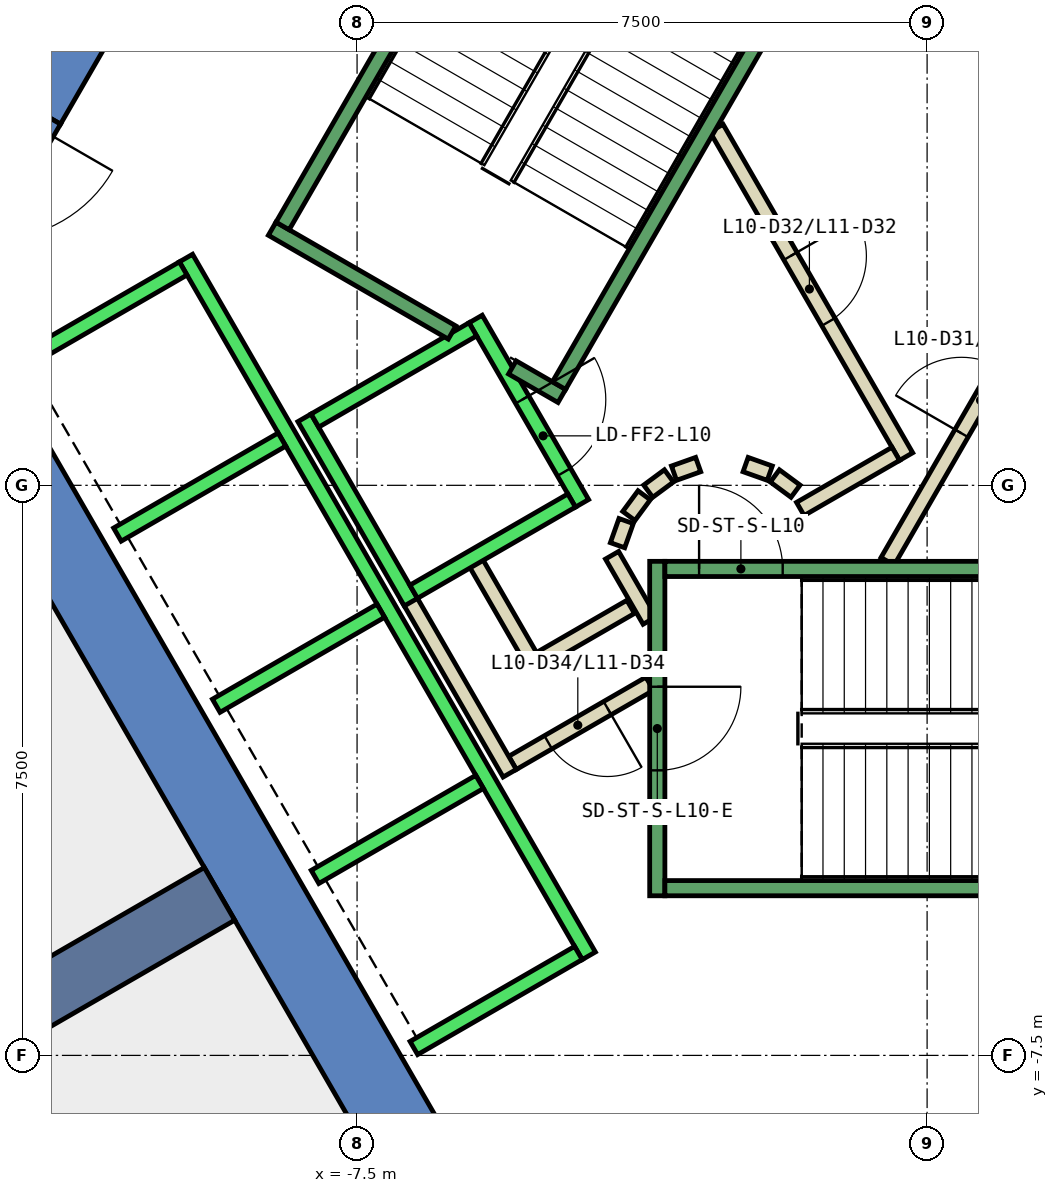
"""IFC4 building model, lengths in metres.
Left out: names, types, materials, properties, quantities, classifications, styles, units other than length and angle.
Written with IfcOpenShell. Run it as: python <this file> out.ifc"""

import sys

from ifc_helpers import new_model, si_unit, direction, frame, frame_2d, origin, place, context, subcontext, project, spatial, polyline, rectangle, outline, extrude, element, fill, save


model = new_model("IFC4")
c1 = context("Model", 3, precision=1e-05, world=origin(), true_north=direction((0.0, 1.0)))
c2 = subcontext(c1, "Body", "Model", "MODEL_VIEW")
j1 = project(units=[si_unit("LENGTHUNIT", "METRE"), si_unit("PLANEANGLEUNIT", "RADIAN")], contexts=[c1])
p1 = place(None, origin())
s1 = spatial("IfcSite", under=j1, at=p1, CompositionType="ELEMENT")
p2 = place(p1, origin())
s2 = spatial("IfcBuilding", under=s1, at=p2, CompositionType="ELEMENT")
p3 = place(p2, frame((0.0, 0.0, 51.8)))
s3 = spatial("IfcBuildingStorey", under=s2, at=p3, CompositionType="ELEMENT", Elevation=51.8)
p4 = place(p3, frame((0.0, 0.0, -0.4)))
e1 = element("IfcWall", 1, at=p4, inside=s3, PredefinedType="SHEAR", context=c2, shape_type="SweptSolid", body=[
    extrude(outline(polyline([(-12.267, 5.252), (-11.402, 4.752), (-6.351, 13.5), (-6.928, 14.5), (-12.267, 5.252)])), origin(), (0.0, 0.0, 1.0), 4.2),
])
p5 = place(p3, frame((0.0, 0.0, 3.6)))
e2 = element("IfcWall", 2, at=p5, inside=s3, PredefinedType="SHEAR", context=c2, shape_type="SweptSolid", body=[
    extrude(outline(polyline([(-13.267, 3.52), (-12.402, 3.02), (-11.402, 4.752), (-12.267, 5.252), (-13.267, 3.52)])), origin(), (0.0, 0.0, 1.0), 0.2),
])
p6 = place(p3, frame((0.0, 0.0, -0.4)))
e3 = element("IfcWall", 3, at=p6, inside=s3, PredefinedType="SHEAR", context=c2, shape_type="SweptSolid", body=[
    extrude(outline(polyline([(-13.856, 2.5), (-6.928, -9.5), (-6.351, -8.5), (-12.702, 2.5), (-13.856, 2.5)])), origin(), (0.0, 0.0, 1.0), 4.2),
])
p7 = place(p3, frame((-9.31, -5.375, -0.4), z_axis=(0.0, 0.0, 1.0), x_axis=(-0.866017533419, -0.500013631625, 0.0)))
e4 = element("IfcWall", 4, at=p7, inside=s3, PredefinedType="SHEAR", context=c2, shape_type="SweptSolid", body=[
    extrude(rectangle(XDim=9.0, YDim=0.8, at=frame_2d((4.5, 0.0))), origin(), (0.0, 0.0, 1.0), 4.2),
])
p8 = place(p3, frame((-3.9, -1.599, 0.0), z_axis=(0.0, 0.0, 1.0), x_axis=(-0.865969445389, -0.500096910261, 0.0)))
e5 = element("IfcWall", 5, at=p8, inside=s3, PredefinedType="PARTITIONING", context=c2, shape_type="SweptSolid", body=[
    extrude(rectangle(XDim=1.373, YDim=0.2, at=frame_2d((0.687, 0.0))), origin(), (0.0, 0.0, 1.0), 3.8),
])
p9 = place(p3, frame((-5.126, -2.422, 0.0), z_axis=(0.0, 0.0, 1.0), x_axis=(-0.500062241894, 0.865989465428, 0.0)))
e6 = element("IfcWall", 6, at=p9, inside=s3, PredefinedType="PARTITIONING", context=c2, shape_type="SweptSolid", body=[
    extrude(rectangle(XDim=1.7, YDim=0.2, at=frame_2d((0.85, 0.0))), origin(), (0.0, 0.0, 1.0), 3.8),
])
p10 = place(p3, frame((-3.65, -2.61, 0.0), z_axis=(0.0, 0.0, 1.0), x_axis=(-0.866072462134, -0.499918483688, 0.0)))
e7 = element("IfcWall", 7, at=p10, inside=s3, PredefinedType="PARTITIONING", context=c2, shape_type="SweptSolid", body=[
    extrude(rectangle(XDim=2.084, YDim=0.2, at=frame_2d((1.042, 0.0))), origin(), (0.0, 0.0, 1.0), 3.8),
])
p11 = place(p10, frame((0.642, 0.0, 0.0)))
e8 = element("IfcOpeningElement", 8, at=p11, cuts=e7, PredefinedType="OPENING", context=c2, shape_type="SweptSolid", body=[
    extrude(rectangle(XDim=0.9, YDim=2.1, at=frame_2d((0.45, 1.05))), frame((0.0, 0.11, 0.0), z_axis=(0.0, -1.0, 0.0), x_axis=(1.0, 0.0, 0.0)), (0.0, 0.0, 1.0), 0.22),
])
p12 = place(p3, frame((-5.492, -3.788, 0.0), z_axis=(0.0, 0.0, 1.0), x_axis=(-0.500008949224, 0.866020236886, 0.0)))
e9 = element("IfcWall", 9, at=p12, inside=s3, PredefinedType="PARTITIONING", context=c2, shape_type="SweptSolid", body=[
    extrude(rectangle(XDim=2.68, YDim=0.2, at=frame_2d((1.34, 0.0))), origin(), (0.0, 0.0, 1.0), 3.8),
])
p13 = place(p3, frame((-4.145, -0.92, 0.0), z_axis=(0.0, 0.0, 1.0), x_axis=(0.499743786207, -0.866173278362, 0.0)))
e10 = element("IfcWall", 10, at=p13, inside=s3, PredefinedType="PARTITIONING", context=c2, shape_type="SweptSolid", body=[
    extrude(rectangle(XDim=0.991, YDim=0.2, at=frame_2d((0.495, 0.0))), origin(), (0.0, 0.0, 1.0), 3.8),
])
p14 = place(p3, frame((-0.52, -1.0, 0.0), z_axis=(0.0, 0.0, 1.0), x_axis=(0.50011622646, 0.865958290007, 0.0)))
e11 = element("IfcWall", 11, at=p14, inside=s3, PredefinedType="PARTITIONING", context=c2, shape_type="SweptSolid", body=[
    extrude(rectangle(XDim=4.991, YDim=0.2, at=frame_2d((2.496, 0.0))), origin(), (0.0, 0.0, 1.0), 3.8),
])
p15 = place(p14, frame((1.945, 0.0, 0.0)))
e12 = element("IfcOpeningElement", 12, at=p15, cuts=e11, PredefinedType="OPENING", context=c2, shape_type="SweptSolid", body=[
    extrude(rectangle(XDim=1.0, YDim=2.1, at=frame_2d((0.5, 1.05))), frame((0.0, 0.11, 0.0), z_axis=(0.0, -1.0, 0.0), x_axis=(1.0, 0.0, 0.0)), (0.0, 0.0, 1.0), 0.22),
])
p16 = place(p3, frame((-2.771, 4.7, 0.0), z_axis=(0.0, 0.0, 1.0), x_axis=(0.499969479948, -0.866043023828, 0.0)))
e13 = element("IfcWall", 13, at=p16, inside=s3, PredefinedType="PARTITIONING", context=c2, shape_type="SweptSolid", body=[
    extrude(rectangle(XDim=4.99, YDim=0.2, at=frame_2d((2.495, 0.0))), origin(), (0.0, 0.0, 1.0), 3.8),
])
p17 = place(p16, frame((1.945, 0.0, 0.0)))
e14 = element("IfcOpeningElement", 14, at=p17, cuts=e13, PredefinedType="OPENING", context=c2, shape_type="SweptSolid", body=[
    extrude(rectangle(XDim=1.0, YDim=2.1, at=frame_2d((0.5, 1.05))), frame((0.0, 0.11, 0.0), z_axis=(0.0, -1.0, 0.0), x_axis=(1.0, 0.0, 0.0)), (0.0, 0.0, 1.0), 0.22),
])
p18 = place(p3, frame((-0.412, 0.414, 0.0), z_axis=(0.0, 0.0, 1.0), x_axis=(-0.866017369001, -0.500013916395, 0.0)))
e15 = element("IfcWall", 15, at=p18, inside=s3, PredefinedType="PARTITIONING", context=c2, shape_type="SweptSolid", body=[
    extrude(rectangle(XDim=1.45, YDim=0.2, at=frame_2d((0.725, 0.0))), origin(), (0.0, 0.0, 1.0), 3.8),
])
p19 = place(p3, frame((-1.731, -0.077, 0.0), z_axis=(0.0, 0.0, 1.0), x_axis=(-0.804311165252, 0.594208338422, 0.0)))
e16 = element("IfcWall", 16, at=p19, inside=s3, PredefinedType="PARTITIONING", context=c2, shape_type="SweptSolid", body=[
    extrude(rectangle(XDim=0.338, YDim=0.2, at=frame_2d((0.169, 0.0))), origin(), (0.0, 0.0, 1.0), 3.8),
])
p20 = place(p3, frame((-2.07, 0.16, 0.0), z_axis=(0.0, 0.0, 1.0), x_axis=(-0.942199461132, 0.335052496547, 0.0)))
e17 = element("IfcWall", 17, at=p20, inside=s3, PredefinedType="PARTITIONING", context=c2, shape_type="SweptSolid", body=[
    extrude(rectangle(XDim=0.337, YDim=0.2, at=frame_2d((0.169, 0.0))), origin(), (0.0, 0.0, 1.0), 3.8),
])
p21 = place(p3, frame((-3.012, 0.273, 0.0), z_axis=(0.0, 0.0, 1.0), x_axis=(-0.942280615813, -0.334824194261, 0.0)))
e18 = element("IfcWall", 18, at=p21, inside=s3, PredefinedType="PARTITIONING", context=c2, shape_type="SweptSolid", body=[
    extrude(rectangle(XDim=0.338, YDim=0.2, at=frame_2d((0.169, 0.0))), origin(), (0.0, 0.0, 1.0), 3.8),
])
p22 = place(p3, frame((-3.397, 0.124, 0.0), z_axis=(0.0, 0.0, 1.0), x_axis=(-0.804311165252, -0.594208338422, 0.0)))
e19 = element("IfcWall", 19, at=p22, inside=s3, PredefinedType="PARTITIONING", context=c2, shape_type="SweptSolid", body=[
    extrude(rectangle(XDim=0.338, YDim=0.2, at=frame_2d((0.169, 0.0))), origin(), (0.0, 0.0, 1.0), 3.8),
])
p23 = place(p3, frame((-3.723, -0.131, 0.0), z_axis=(0.0, 0.0, 1.0), x_axis=(-0.594675113454, -0.803966112121, 0.0)))
e20 = element("IfcWall", 20, at=p23, inside=s3, PredefinedType="PARTITIONING", context=c2, shape_type="SweptSolid", body=[
    extrude(rectangle(XDim=0.338, YDim=0.2, at=frame_2d((0.169, 0.0))), origin(), (0.0, 0.0, 1.0), 3.8),
])
p24 = place(p3, frame((-3.96, -0.47, 0.0), z_axis=(0.0, 0.0, 1.0), x_axis=(-0.334824194261, -0.942280615813, 0.0)))
e21 = element("IfcWall", 21, at=p24, inside=s3, PredefinedType="PARTITIONING", context=c2, shape_type="SweptSolid", body=[
    extrude(rectangle(XDim=0.338, YDim=0.2, at=frame_2d((0.169, 0.0))), origin(), (0.0, 0.0, 1.0), 3.8),
])
p25 = place(p3, frame((-5.94, 2.188, 0.0), z_axis=(0.0, 0.0, 1.0), x_axis=(0.49994636267, -0.866056369097, 0.0)))
e22 = element("IfcWall", 22, at=p25, inside=s3, PredefinedType="STANDARD", context=c2, shape_type="SweptSolid", body=[
    extrude(rectangle(XDim=2.8, YDim=0.2, at=frame_2d((1.4, 0.0))), origin(), (0.0, 0.0, 1.0), 3.8),
])
p26 = place(p25, frame((1.225, 0.0, 0.0)))
e23 = element("IfcOpeningElement", 23, at=p26, cuts=e22, PredefinedType="OPENING", context=c2, shape_type="SweptSolid", body=[
    extrude(rectangle(XDim=1.1, YDim=2.1, at=frame_2d((0.55, 1.05))), frame((0.0, 0.11, 0.0), z_axis=(0.0, -1.0, 0.0), x_axis=(1.0, 0.0, 0.0)), (0.0, 0.0, 1.0), 0.22),
])
p27 = place(p3, frame((-8.192, 0.888, 0.0), z_axis=(0.0, 0.0, 1.0), x_axis=(0.49994636267, -0.866056369097, 0.0)))
e24 = element("IfcWall", 24, at=p27, inside=s3, PredefinedType="STANDARD", context=c2, shape_type="SweptSolid", body=[
    extrude(rectangle(XDim=2.8, YDim=0.2, at=frame_2d((1.4, 0.0))), origin(), (0.0, 0.0, 1.0), 3.8),
])
for number, where, z_axis, x_axis in (
    (25, (-5.977, 2.052, 0.0), (0.0, 0.0, 1.0), (-0.866, -0.5, 0.0)),
    (26, (-4.677, -0.2, 0.0), (0.0, 0.0, 1.0), (-0.866, -0.5, 0.0)),
):
    element("IfcWall", number, at=place(p3, frame(where, z_axis=z_axis, x_axis=x_axis)), inside=s3, PredefinedType="STANDARD", context=c2, shape_type="SweptSolid", body=[
        extrude(rectangle(XDim=2.399, YDim=0.2, at=frame_2d((1.2, 0.0))), origin(), (0.0, 0.0, 1.0), 3.8),
    ])
p28 = place(p3, frame((-9.751, 2.99, 0.0), z_axis=(0.0, 0.0, 1.0), x_axis=(0.50000090737, -0.866024879913, 0.0)))
e27 = element("IfcWall", 27, at=p28, inside=s3, PredefinedType="STANDARD", context=c2, shape_type="SweptSolid", body=[
    extrude(rectangle(XDim=10.6, YDim=0.2, at=frame_2d((5.3, 0.0))), origin(), (0.0, 0.0, 1.0), 3.8),
])
p29 = place(p3, frame((-9.788, 2.853, 0.0), z_axis=(0.0, 0.0, 1.0), x_axis=(-0.865998541277, -0.500046524342, 0.0)))
e28 = element("IfcWall", 28, at=p29, inside=s3, PredefinedType="STANDARD", context=c2, shape_type="SweptSolid", body=[
    extrude(rectangle(XDim=2.5, YDim=0.2, at=frame_2d((1.25, 0.0))), origin(), (0.0, 0.0, 1.0), 3.8),
])
for number, where, z_axis, x_axis in (
    (29, (-8.488, 0.602, 0.0), (0.0, 0.0, 1.0), (-0.866, -0.5, 0.0)),
    (30, (-7.188, -1.65, 0.0), (0.0, 0.0, 1.0), (-0.866, -0.5, 0.0)),
    (31, (-5.888, -3.902, 0.0), (0.0, 0.0, 1.0), (-0.866, -0.5, 0.0)),
    (32, (-4.588, -6.153, 0.0), (0.0, 0.0, 1.0), (-0.866, -0.5, 0.0)),
):
    element("IfcWall", number, at=place(p3, frame(where, z_axis=z_axis, x_axis=x_axis)), inside=s3, PredefinedType="STANDARD", context=c2, shape_type="SweptSolid", body=[
        extrude(rectangle(XDim=2.5, YDim=0.2, at=frame_2d((1.25, 0.0))), origin(), (0.0, 0.0, 1.0), 3.8),
    ])
p30 = place(p3, frame((-3.55, -1.0, 0.0), z_axis=(0.0, 0.0, 1.0), x_axis=(0.0, -1.0, 0.0)))
e33 = element("IfcWall", 33, at=p30, inside=s3, PredefinedType="STANDARD", context=c2, shape_type="SweptSolid", body=[
    extrude(rectangle(XDim=4.4, YDim=0.2, at=frame_2d((2.2, 0.0))), origin(), (0.0, 0.0, 1.0), 3.8),
])
p31 = place(p30, frame((1.65, 0.0, 0.0)))
e34 = element("IfcOpeningElement", 34, at=p31, cuts=e33, PredefinedType="OPENING", context=c2, shape_type="SweptSolid", body=[
    extrude(rectangle(XDim=1.1, YDim=2.2, at=frame_2d((0.55, 1.1))), frame((0.0, 0.11, 0.0), z_axis=(0.0, -1.0, 0.0), x_axis=(1.0, 0.0, 0.0)), (0.0, 0.0, 1.0), 0.22),
])
p32 = place(p3, frame((-3.45, -1.1, 0.0), z_axis=(0.0, 0.0, 1.0), x_axis=(1.0, 0.0, 0.0)))
e35 = element("IfcWall", 35, at=p32, inside=s3, PredefinedType="STANDARD", context=c2, shape_type="SweptSolid", body=[
    extrude(rectangle(XDim=6.9, YDim=0.2, at=frame_2d((3.45, 0.0))), origin(), (0.0, 0.0, 1.0), 3.8),
])
p33 = place(p32, frame((0.45, 0.0, 0.0)))
e36 = element("IfcOpeningElement", 36, at=p33, cuts=e35, PredefinedType="OPENING", context=c2, shape_type="SweptSolid", body=[
    extrude(rectangle(XDim=1.1, YDim=2.2, at=frame_2d((0.55, 1.1))), frame((0.0, 0.11, 0.0), z_axis=(0.0, -1.0, 0.0), x_axis=(1.0, 0.0, 0.0)), (0.0, 0.0, 1.0), 0.22),
])
p34 = place(p3, frame((-3.45, -5.3, 0.0), z_axis=(0.0, 0.0, 1.0), x_axis=(1.0, 0.0, 0.0)))
e37 = element("IfcWall", 37, at=p34, inside=s3, PredefinedType="STANDARD", context=c2, shape_type="SweptSolid", body=[
    extrude(rectangle(XDim=6.9, YDim=0.2, at=frame_2d((3.45, 0.0))), origin(), (0.0, 0.0, 1.0), 3.8),
])
p35 = place(p3, frame((-6.25, 2.01, 0.0), z_axis=(0.0, 0.0, 1.0), x_axis=(-0.86611865017, 0.499838457731, 0.0)))
e38 = element("IfcWall", 38, at=p35, inside=s3, PredefinedType="STANDARD", context=c2, shape_type="SweptSolid", body=[
    extrude(rectangle(XDim=2.733, YDim=0.2, at=frame_2d((1.366, 0.0))), origin(), (0.0, 0.0, 1.0), 3.8),
])
p36 = place(p3, frame((-4.806, 1.176, 0.0), z_axis=(0.0, 0.0, 1.0), x_axis=(-0.866558586415, 0.499075361355, 0.0)))
e39 = element("IfcWall", 39, at=p36, inside=s3, PredefinedType="STANDARD", context=c2, shape_type="SweptSolid", body=[
    extrude(rectangle(XDim=0.751, YDim=0.2, at=frame_2d((0.376, 0.0))), origin(), (0.0, 0.0, 1.0), 3.8),
])
p37 = place(p3, frame((-1.393, 7.288, 0.0), z_axis=(0.0, 0.0, 1.0), x_axis=(-0.499963383562, -0.866046543262, 0.0)))
e40 = element("IfcWall", 40, at=p37, inside=s3, PredefinedType="STANDARD", context=c2, shape_type="SweptSolid", body=[
    extrude(rectangle(XDim=6.9, YDim=0.2, at=frame_2d((3.45, 0.0))), origin(), (0.0, 0.0, 1.0), 3.8),
])
p38 = place(p37, frame((0.45, 0.0, 0.0)))
e41 = element("IfcOpeningElement", 41, at=p38, cuts=e40, PredefinedType="OPENING", context=c2, shape_type="SweptSolid", body=[
    extrude(rectangle(XDim=1.1, YDim=2.2, at=frame_2d((0.55, 1.1))), frame((0.0, 0.11, 0.0), z_axis=(0.0, -1.0, 0.0), x_axis=(1.0, 0.0, 0.0)), (0.0, 0.0, 1.0), 0.22),
])
p39 = place(p3, frame((-5.03, 9.388, 0.0), z_axis=(0.0, 0.0, 1.0), x_axis=(-0.499978703459, -0.866037698999, 0.0)))
e42 = element("IfcWall", 42, at=p39, inside=s3, PredefinedType="STANDARD", context=c2, shape_type="SweptSolid", body=[
    extrude(rectangle(XDim=6.9, YDim=0.2, at=frame_2d((3.45, 0.0))), origin(), (0.0, 0.0, 1.0), 3.8),
])
p40 = place(p15, origin())
e43 = element("IfcDoor", 43, at=p40, inside=s3, OperationType="SINGLE_SWING_LEFT", PredefinedType="DOOR", context=c2, shape_type="SweptSolid", body=[
    extrude(rectangle(XDim=1.0, YDim=2.1, at=frame_2d((0.5, 1.05))), frame((0.0, 0.025, 0.0), z_axis=(0.0, -1.0, 0.0), x_axis=(1.0, 0.0, 0.0)), (0.0, 0.0, 1.0), 0.05),
])
fill(e12, e43)
p41 = place(p17, origin())
e44 = element("IfcDoor", 44, at=p41, inside=s3, OperationType="SINGLE_SWING_RIGHT", PredefinedType="DOOR", context=c2, shape_type="SweptSolid", body=[
    extrude(rectangle(XDim=1.0, YDim=2.1, at=frame_2d((0.5, 1.05))), frame((0.0, 0.025, 0.0), z_axis=(0.0, -1.0, 0.0), x_axis=(1.0, 0.0, 0.0)), (0.0, 0.0, 1.0), 0.05),
])
fill(e14, e44)
p42 = place(p11, origin())
e45 = element("IfcDoor", 45, at=p42, inside=s3, OperationType="SINGLE_SWING_LEFT", PredefinedType="DOOR", context=c2, shape_type="SweptSolid", body=[
    extrude(rectangle(XDim=0.9, YDim=2.1, at=frame_2d((0.45, 1.05))), frame((0.0, 0.025, 0.0), z_axis=(0.0, -1.0, 0.0), x_axis=(1.0, 0.0, 0.0)), (0.0, 0.0, 1.0), 0.05),
])
fill(e8, e45)
p43 = place(p26, origin())
e46 = element("IfcDoor", 46, at=p43, inside=s3, OperationType="SLIDING_TO_LEFT", PredefinedType="DOOR", context=c2, shape_type="SweptSolid", body=[
    extrude(rectangle(XDim=1.1, YDim=2.1, at=frame_2d((0.55, 1.05))), frame((0.0, 0.025, 0.0), z_axis=(0.0, -1.0, 0.0), x_axis=(1.0, 0.0, 0.0)), (0.0, 0.0, 1.0), 0.05),
])
fill(e23, e46)
p44 = place(p33, origin())
e47 = element("IfcDoor", 47, at=p44, inside=s3, OperationType="SINGLE_SWING_LEFT", PredefinedType="DOOR", context=c2, shape_type="SweptSolid", body=[
    extrude(rectangle(XDim=1.1, YDim=2.2, at=frame_2d((0.55, 1.1))), frame((0.0, 0.025, 0.0), z_axis=(0.0, -1.0, 0.0), x_axis=(1.0, 0.0, 0.0)), (0.0, 0.0, 1.0), 0.05),
])
fill(e36, e47)
p45 = place(p31, origin())
e48 = element("IfcDoor", 48, at=p45, inside=s3, OperationType="SINGLE_SWING_LEFT", PredefinedType="DOOR", context=c2, shape_type="SweptSolid", body=[
    extrude(rectangle(XDim=1.1, YDim=2.2, at=frame_2d((0.55, 1.1))), frame((0.0, 0.025, 0.0), z_axis=(0.0, -1.0, 0.0), x_axis=(1.0, 0.0, 0.0)), (0.0, 0.0, 1.0), 0.05),
])
fill(e34, e48)
save(model, sys.argv[1])
